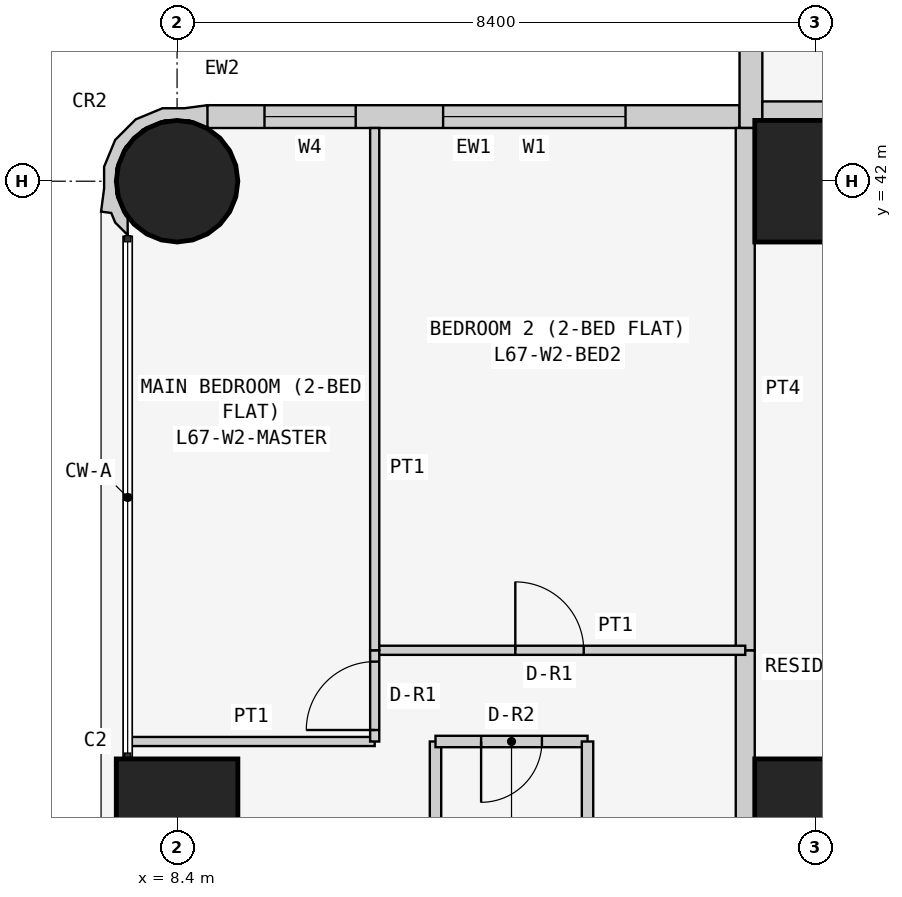
"""IFC4 building model, lengths in metres.
Left out: names, types, materials, properties, quantities, classifications, styles, units other than length and angle.
Written with IfcOpenShell. Run it as: python <this file> out.ifc"""

import sys

from ifc_helpers import new_model, si_unit, direction, frame, frame_2d, origin, origin_2d, place, context, subcontext, project, spatial, polyline, rectangle, circle, outline, extrude, element, fill, save


model = new_model("IFC4")
c1 = context("Model", 3, precision=1e-05, world=origin(), true_north=direction((0.0, 1.0)))
c2 = subcontext(c1, "Body", "Model", "MODEL_VIEW")
j1 = project(units=[si_unit("LENGTHUNIT", "METRE"), si_unit("PLANEANGLEUNIT", "RADIAN")], contexts=[c1])
p1 = place(None, origin())
s1 = spatial("IfcSite", under=j1, at=p1, CompositionType="ELEMENT")
p2 = place(p1, origin())
s2 = spatial("IfcBuilding", under=s1, at=p2, CompositionType="ELEMENT")
p3 = place(p2, frame((0.0, 0.0, 257.7)))
s3 = spatial("IfcBuildingStorey", under=s2, at=p3, CompositionType="ELEMENT", Elevation=257.7)
p4 = place(p3, frame((8.4, 33.6, 0.0), z_axis=(0.0, 0.0, 1.0), x_axis=(1.0, 0.0, 0.0)))
e1 = element("IfcColumn", 1, at=p4, inside=s3, PredefinedType="COLUMN", context=c2, shape_type="SweptSolid", body=[
    extrude(rectangle(XDim=1.6, YDim=1.6, at=origin_2d()), origin(), (0.0, 0.0, 1.0), 3.6),
])
p5 = place(p3, frame((8.4, 42.0, 0.0), z_axis=(0.0, 0.0, 1.0), x_axis=(1.0, 0.0, 0.0)))
e2 = element("IfcColumn", 2, at=p5, inside=s3, PredefinedType="COLUMN", context=c2, shape_type="SweptSolid", body=[
    extrude(circle(Radius=0.8, at=origin_2d()), origin(), (0.0, 0.0, 1.0), 3.6),
])
for number, where, z_axis, x_axis in (
    (3, (16.8, 33.6, 0.0), (0.0, 0.0, 1.0), (1.0, 0.0, 0.0)),
    (4, (16.8, 42.0, 0.0), (0.0, 0.0, 1.0), (1.0, 0.0, 0.0)),
):
    element("IfcColumn", number, at=place(p3, frame(where, z_axis=z_axis, x_axis=x_axis)), inside=s3, PredefinedType="COLUMN", context=c2, shape_type="SweptSolid", body=[
        extrude(rectangle(XDim=1.6, YDim=1.6, at=origin_2d()), origin(), (0.0, 0.0, 1.0), 3.6),
    ])
p6 = place(p3, frame((15.8, 42.85, 0.0), z_axis=(0.0, 0.0, 1.0), x_axis=(-1.0, 0.0, 0.0)))
e5 = element("IfcWall", 5, at=p6, inside=s3, PredefinedType="SOLIDWALL", context=c2, shape_type="SweptSolid", body=[
    extrude(rectangle(XDim=7.0, YDim=0.3, at=frame_2d((3.5, 0.0))), origin(), (0.0, 0.0, 1.0), 3.45),
])
p7 = place(p6, frame((1.5, 0.0, 0.9)))
e6 = element("IfcOpeningElement", 6, at=p7, cuts=e5, PredefinedType="OPENING", context=c2, shape_type="SweptSolid", body=[
    extrude(rectangle(XDim=2.4, YDim=1.5, at=frame_2d((1.2, 0.75))), frame((0.0, 0.16, 0.0), z_axis=(0.0, -1.0, 0.0), x_axis=(1.0, 0.0, 0.0)), (0.0, 0.0, 1.0), 0.32),
])
p8 = place(p6, frame((5.05, 0.0, 0.9)))
e7 = element("IfcOpeningElement", 7, at=p8, cuts=e5, PredefinedType="OPENING", context=c2, shape_type="SweptSolid", body=[
    extrude(rectangle(XDim=1.2, YDim=1.5, at=frame_2d((0.6, 0.75))), frame((0.0, 0.16, 0.0), z_axis=(0.0, -1.0, 0.0), x_axis=(1.0, 0.0, 0.0)), (0.0, 0.0, 1.0), 0.32),
])
p9 = place(p3, frame((15.95, 50.0, 0.0), z_axis=(0.0, 0.0, 1.0), x_axis=(0.0, -1.0, 0.0)))
e8 = element("IfcWall", 8, at=p9, inside=s3, PredefinedType="SOLIDWALL", context=c2, shape_type="SweptSolid", body=[
    extrude(rectangle(XDim=7.3, YDim=0.3, at=frame_2d((3.65, 0.0))), origin(), (0.0, 0.0, 1.0), 3.45),
])
p10 = place(p9, frame((3.1, 0.0, 0.9)))
e9 = element("IfcOpeningElement", 9, at=p10, cuts=e8, PredefinedType="OPENING", context=c2, shape_type="SweptSolid", body=[
    extrude(rectangle(XDim=2.4, YDim=1.5, at=frame_2d((1.2, 0.75))), frame((0.0, 0.16, 0.0), z_axis=(0.0, -1.0, 0.0), x_axis=(1.0, 0.0, 0.0)), (0.0, 0.0, 1.0), 0.32),
])
p11 = place(p9, frame((0.75, 0.0, 0.9)))
e10 = element("IfcOpeningElement", 10, at=p11, cuts=e8, PredefinedType="OPENING", context=c2, shape_type="SweptSolid", body=[
    extrude(rectangle(XDim=1.2, YDim=1.5, at=frame_2d((0.6, 0.75))), frame((0.0, 0.16, 0.0), z_axis=(0.0, -1.0, 0.0), x_axis=(1.0, 0.0, 0.0)), (0.0, 0.0, 1.0), 0.32),
])
p12 = place(p3, frame((8.727, 42.817, 0.0), z_axis=(0.0, 0.0, 1.0), x_axis=(-0.93923434088, 0.343276641956, 0.0)))
e11 = element("IfcWall", 11, at=p12, inside=s3, PredefinedType="SOLIDWALL", context=c2, shape_type="SweptSolid", body=[
    extrude(outline(polyline([(-0.127, 0.078), (-0.146, 0.071), (-0.006, -0.197), (0.266, -0.055), (0.535, 0.044), (0.817, 0.302), (0.977, 0.648), (0.994, 1.03), (0.895, 1.3), (0.829, 1.599), (0.697, 1.569), (0.604, 1.67), (0.394, 1.767), (0.471, 1.556), (0.509, 1.539), (0.724, 1.304), (0.833, 1.005), (0.82, 0.687), (0.686, 0.397), (0.451, 0.182), (0.152, 0.073), (-0.116, 0.084), (-0.127, 0.078)])), origin(), (0.0, 0.0, 1.0), 3.45),
])
p13 = place(p3, frame((16.1, 42.925, 0.0), z_axis=(0.0, 0.0, 1.0), x_axis=(1.0, 0.0, 0.0)))
e12 = element("IfcWall", 12, at=p13, inside=s3, PredefinedType="PARTITIONING", context=c2, shape_type="SweptSolid", body=[
    extrude(rectangle(XDim=6.471, YDim=0.25, at=frame_2d((3.235, 0.0))), origin(), (0.0, 0.0, 1.0), 3.45),
])
p14 = place(p3, frame((15.875, 29.4, 0.0), z_axis=(0.0, 0.0, 1.0), x_axis=(0.0, 1.0, 0.0)))
e13 = element("IfcWall", 13, at=p14, inside=s3, PredefinedType="PARTITIONING", context=c2, shape_type="SweptSolid", body=[
    extrude(rectangle(XDim=6.429, YDim=0.25, at=frame_2d((3.215, 0.0))), origin(), (0.0, 0.0, 1.0), 3.45),
])
p15 = place(p14, frame((0.5, 0.0, 0.0)))
e14 = element("IfcOpeningElement", 14, at=p15, cuts=e13, PredefinedType="OPENING", context=c2, shape_type="SweptSolid", body=[
    extrude(rectangle(XDim=1.0, YDim=2.1, at=frame_2d((0.5, 1.05))), frame((0.0, 0.135, 0.0), z_axis=(0.0, -1.0, 0.0), x_axis=(1.0, 0.0, 0.0)), (0.0, 0.0, 1.0), 0.27),
])
p16 = place(p3, frame((15.875, 35.829, 0.0), z_axis=(0.0, 0.0, 1.0), x_axis=(0.0, 1.0, 0.0)))
e15 = element("IfcWall", 15, at=p16, inside=s3, PredefinedType="PARTITIONING", context=c2, shape_type="SweptSolid", body=[
    extrude(rectangle(XDim=6.871, YDim=0.25, at=frame_2d((3.436, 0.0))), origin(), (0.0, 0.0, 1.0), 3.45),
])
p17 = place(p3, frame((11.8, 29.4, 0.0), z_axis=(0.0, 0.0, 1.0), x_axis=(0.0, 1.0, 0.0)))
e16 = element("IfcWall", 16, at=p17, inside=s3, PredefinedType="PARTITIONING", context=c2, shape_type="SweptSolid", body=[
    extrude(rectangle(XDim=5.229, YDim=0.15, at=frame_2d((2.615, 0.0))), origin(), (0.0, 0.0, 1.0), 3.45),
])
p18 = place(p3, frame((11.8, 34.629, 0.0), z_axis=(0.0, 0.0, 1.0), x_axis=(1.0, 0.0, 0.0)))
e17 = element("IfcWall", 17, at=p18, inside=s3, PredefinedType="PARTITIONING", context=c2, shape_type="SweptSolid", body=[
    extrude(rectangle(XDim=2.0, YDim=0.15, at=frame_2d((1.0, 0.0))), origin(), (0.0, 0.0, 1.0), 3.45),
])
p19 = place(p18, frame((0.6, 0.0, 0.0)))
e18 = element("IfcOpeningElement", 18, at=p19, cuts=e17, PredefinedType="OPENING", context=c2, shape_type="SweptSolid", body=[
    extrude(rectangle(XDim=0.8, YDim=2.1, at=frame_2d((0.4, 1.05))), frame((0.0, 0.085, 0.0), z_axis=(0.0, -1.0, 0.0), x_axis=(1.0, 0.0, 0.0)), (0.0, 0.0, 1.0), 0.17),
])
p20 = place(p3, frame((13.8, 34.629, 0.0), z_axis=(0.0, 0.0, 1.0), x_axis=(0.0, -1.0, 0.0)))
e19 = element("IfcWall", 19, at=p20, inside=s3, PredefinedType="PARTITIONING", context=c2, shape_type="SweptSolid", body=[
    extrude(rectangle(XDim=5.229, YDim=0.15, at=frame_2d((2.615, 0.0))), origin(), (0.0, 0.0, 1.0), 3.45),
])
p21 = place(p3, frame((11.0, 35.829, 0.0), z_axis=(0.0, 0.0, 1.0), x_axis=(1.0, 0.0, 0.0)))
e20 = element("IfcWall", 20, at=p21, inside=s3, PredefinedType="PARTITIONING", context=c2, shape_type="SweptSolid", body=[
    extrude(rectangle(XDim=4.875, YDim=0.12, at=frame_2d((2.438, 0.0))), origin(), (0.0, 0.0, 1.0), 3.45),
])
p22 = place(p21, frame((1.85, 0.0, 0.0)))
e21 = element("IfcOpeningElement", 21, at=p22, cuts=e20, PredefinedType="OPENING", context=c2, shape_type="SweptSolid", body=[
    extrude(rectangle(XDim=0.9, YDim=2.1, at=frame_2d((0.45, 1.05))), frame((0.0, 0.07, 0.0), z_axis=(0.0, -1.0, 0.0), x_axis=(1.0, 0.0, 0.0)), (0.0, 0.0, 1.0), 0.14),
])
p23 = place(p3, frame((7.75, 34.629, 0.0), z_axis=(0.0, 0.0, 1.0), x_axis=(1.0, 0.0, 0.0)))
e22 = element("IfcWall", 22, at=p23, inside=s3, PredefinedType="PARTITIONING", context=c2, shape_type="SweptSolid", body=[
    extrude(rectangle(XDim=3.25, YDim=0.12, at=frame_2d((1.625, 0.0))), origin(), (0.0, 0.0, 1.0), 3.45),
])
p24 = place(p3, frame((11.0, 34.629, 0.0), z_axis=(0.0, 0.0, 1.0), x_axis=(0.0, 1.0, 0.0)))
e23 = element("IfcWall", 23, at=p24, inside=s3, PredefinedType="PARTITIONING", context=c2, shape_type="SweptSolid", body=[
    extrude(rectangle(XDim=1.2, YDim=0.12, at=frame_2d((0.6, 0.0))), origin(), (0.0, 0.0, 1.0), 3.45),
])
p25 = place(p24, frame((0.151, 0.0, 0.0)))
e24 = element("IfcOpeningElement", 24, at=p25, cuts=e23, PredefinedType="OPENING", context=c2, shape_type="SweptSolid", body=[
    extrude(rectangle(XDim=0.9, YDim=2.1, at=frame_2d((0.45, 1.05))), frame((0.0, 0.07, 0.0), z_axis=(0.0, -1.0, 0.0), x_axis=(1.0, 0.0, 0.0)), (0.0, 0.0, 1.0), 0.14),
])
p26 = place(p3, frame((11.0, 35.829, 0.0), z_axis=(0.0, 0.0, 1.0), x_axis=(0.0, 1.0, 0.0)))
e25 = element("IfcWall", 25, at=p26, inside=s3, PredefinedType="PARTITIONING", context=c2, shape_type="SweptSolid", body=[
    extrude(rectangle(XDim=6.871, YDim=0.12, at=frame_2d((3.436, 0.0))), origin(), (0.0, 0.0, 1.0), 3.45),
])
p27 = place(p7, origin())
e26 = element("IfcWindow", 26, at=p27, inside=s3, PartitioningType="SINGLE_PANEL", PredefinedType="WINDOW", context=c2, shape_type="SweptSolid", body=[
    extrude(rectangle(XDim=2.4, YDim=1.5, at=frame_2d((1.2, 0.75))), frame((0.0, 0.03, 0.0), z_axis=(0.0, -1.0, 0.0), x_axis=(1.0, 0.0, 0.0)), (0.0, 0.0, 1.0), 0.06),
])
fill(e6, e26)
p28 = place(p8, origin())
e27 = element("IfcWindow", 27, at=p28, inside=s3, PartitioningType="SINGLE_PANEL", PredefinedType="WINDOW", context=c2, shape_type="SweptSolid", body=[
    extrude(rectangle(XDim=1.2, YDim=1.5, at=frame_2d((0.6, 0.75))), frame((0.0, 0.03, 0.0), z_axis=(0.0, -1.0, 0.0), x_axis=(1.0, 0.0, 0.0)), (0.0, 0.0, 1.0), 0.06),
])
fill(e7, e27)
p29 = place(p19, frame((0.8, 0.0, 0.0), z_axis=(0.0, 0.0, 1.0), x_axis=(-1.0, 0.0, 0.0)))
e28 = element("IfcDoor", 28, at=p29, inside=s3, OperationType="SINGLE_SWING_RIGHT", PredefinedType="DOOR", context=c2, shape_type="SweptSolid", body=[
    extrude(rectangle(XDim=0.8, YDim=2.1, at=frame_2d((0.4, 1.05))), frame((0.0, 0.025, 0.0), z_axis=(0.0, -1.0, 0.0), x_axis=(1.0, 0.0, 0.0)), (0.0, 0.0, 1.0), 0.05),
])
fill(e18, e28)
p30 = place(p22, origin())
e29 = element("IfcDoor", 29, at=p30, inside=s3, OperationType="SINGLE_SWING_LEFT", PredefinedType="DOOR", context=c2, shape_type="SweptSolid", body=[
    extrude(rectangle(XDim=0.9, YDim=2.1, at=frame_2d((0.45, 1.05))), frame((0.0, 0.025, 0.0), z_axis=(0.0, -1.0, 0.0), x_axis=(1.0, 0.0, 0.0)), (0.0, 0.0, 1.0), 0.05),
])
fill(e21, e29)
p31 = place(p25, origin())
e30 = element("IfcDoor", 30, at=p31, inside=s3, OperationType="SINGLE_SWING_LEFT", PredefinedType="DOOR", context=c2, shape_type="SweptSolid", body=[
    extrude(rectangle(XDim=0.9, YDim=2.1, at=frame_2d((0.45, 1.05))), frame((0.0, 0.025, 0.0), z_axis=(0.0, -1.0, 0.0), x_axis=(1.0, 0.0, 0.0)), (0.0, 0.0, 1.0), 0.05),
])
fill(e24, e30)
save(model, sys.argv[1])
